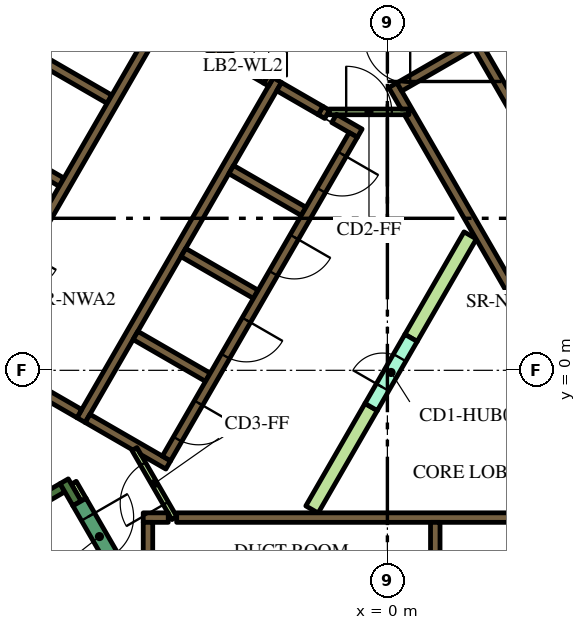
"""IFC4 building model, lengths in metres.
Left out: names, types, materials, properties, quantities, classifications, styles, units other than length and angle.
Written with IfcOpenShell. Run it as: python <this file> out.ifc"""

import sys

from ifc_helpers import new_model, si_unit, direction, frame, frame_2d, origin, place, context, subcontext, project, spatial, polyline, rectangle, outline, extrude, element, fill, save


model = new_model("IFC4")
c1 = context("Model", 3, precision=1e-05, world=origin(), true_north=direction((0.0, 1.0)))
c2 = subcontext(c1, "Body", "Model", "MODEL_VIEW")
j1 = project(units=[si_unit("LENGTHUNIT", "METRE"), si_unit("PLANEANGLEUNIT", "RADIAN")], contexts=[c1])
p1 = place(None, origin())
s1 = spatial("IfcSite", under=j1, at=p1, CompositionType="ELEMENT")
p2 = place(p1, origin())
s2 = spatial("IfcBuilding", under=s1, at=p2, CompositionType="ELEMENT")
p3 = place(p2, frame((0.0, 0.0, 39.3)))
s3 = spatial("IfcBuildingStorey", under=s2, at=p3, CompositionType="ELEMENT", Elevation=39.3)
p4 = place(p3, frame((-15.36, -1.503, 0.0), z_axis=(0.0, 0.0, 1.0), x_axis=(0.50000389221, 0.866023156604, 0.0)))
e1 = element("IfcWall", 1, at=p4, inside=s3, PredefinedType="SOLIDWALL", context=c2, shape_type="SweptSolid", body=[
    extrude(rectangle(XDim=21.0, YDim=0.9, at=frame_2d((10.5, 0.0))), origin(), (0.0, 0.0, 1.0), 3.9),
])
p5 = place(p3, frame((-14.44, -6.49, 0.0), z_axis=(0.0, 0.0, 1.0), x_axis=(0.866022966069, 0.500004222222, 0.0)))
e2 = element("IfcWall", 2, at=p5, inside=s3, PredefinedType="SOLIDWALL", context=c2, shape_type="SweptSolid", body=[
    extrude(rectangle(XDim=6.8, YDim=0.25, at=frame_2d((3.4, 0.0))), origin(), (0.0, 0.0, 1.0), 3.9),
])
p6 = place(p3, frame((-8.168, -3.503, 0.0), z_axis=(0.0, 0.0, 1.0), x_axis=(-0.499952099219, 0.866053057547, 0.0)))
e3 = element("IfcWall", 3, at=p6, inside=s3, PredefinedType="SOLIDWALL", context=c2, shape_type="SweptSolid", body=[
    extrude(rectangle(XDim=0.675, YDim=0.25, at=frame_2d((0.337, 0.0))), origin(), (0.0, 0.0, 1.0), 3.9),
])
p7 = place(p3, frame((-5.545, -3.875, 0.0), z_axis=(0.0, 0.0, 1.0), x_axis=(1.0, 0.0, 0.0)))
e4 = element("IfcWall", 4, at=p7, inside=s3, PredefinedType="SOLIDWALL", context=c2, shape_type="SweptSolid", body=[
    extrude(rectangle(XDim=11.97, YDim=0.25, at=frame_2d((5.985, 0.0))), origin(), (0.0, 0.0, 1.0), 3.9),
])
p8 = place(p3, frame((-6.425, -3.875, 0.0), z_axis=(0.0, 0.0, 1.0), x_axis=(1.0, 0.0, 0.0)))
e5 = element("IfcWall", 5, at=p8, inside=s3, PredefinedType="SOLIDWALL", context=c2, shape_type="SweptSolid", body=[
    extrude(rectangle(XDim=0.658, YDim=0.25, at=frame_2d((0.329, 0.0))), origin(), (0.0, 0.0, 1.0), 3.9),
])
p9 = place(p3, frame((1.26, -4.0, 0.0), z_axis=(0.0, 0.0, 1.0), x_axis=(0.0, -1.0, 0.0)))
e6 = element("IfcWall", 6, at=p9, inside=s3, PredefinedType="SOLIDWALL", context=c2, shape_type="SweptSolid", body=[
    extrude(rectangle(XDim=2.2, YDim=0.25, at=frame_2d((1.1, 0.0))), origin(), (0.0, 0.0, 1.0), 3.9),
])
p10 = place(p3, frame((-6.3, -4.0, 0.0), z_axis=(0.0, 0.0, 1.0), x_axis=(0.0, -1.0, 0.0)))
e7 = element("IfcWall", 7, at=p10, inside=s3, PredefinedType="SOLIDWALL", context=c2, shape_type="SweptSolid", body=[
    extrude(rectangle(XDim=3.154, YDim=0.25, at=frame_2d((1.577, 0.0))), origin(), (0.0, 0.0, 1.0), 3.9),
])
p11 = place(p3, origin())
e8 = element("IfcWall", 8, at=p11, inside=s3, PredefinedType="SOLIDWALL", context=c2, shape_type="SweptSolid", body=[
    extrude(outline(polyline([(0.566, 6.725), (0.566, 6.875), (0.566, 6.875), (0.565, 6.875), (0.361, 6.875), (0.035, 7.439), (0.252, 7.564), (0.377, 7.348), (6.552, -3.348), (6.677, -3.564), (6.46, -3.689), (0.448, 6.725), (0.565, 6.725), (0.566, 6.725), (0.566, 6.725)])), origin(), (0.0, 0.0, 1.0), 3.9),
])
p12 = place(p3, frame((0.314, 7.456, 0.0), z_axis=(0.0, 0.0, 1.0), x_axis=(0.866013897511, 0.50001992892, 0.0)))
e9 = element("IfcWall", 9, at=p12, inside=s3, PredefinedType="SOLIDWALL", context=c2, shape_type="SweptSolid", body=[
    extrude(rectangle(XDim=3.268, YDim=0.25, at=frame_2d((1.634, 0.0))), origin(), (0.0, 0.0, 1.0), 3.9),
])
p13 = place(p3, frame((-8.06, -1.311, 0.0), z_axis=(0.0, 0.0, 1.0), x_axis=(0.50000273126, 0.866023826885, 0.0)))
e10 = element("IfcWall", 10, at=p13, inside=s3, PredefinedType="SOLIDWALL", context=c2, shape_type="SweptSolid", body=[
    extrude(rectangle(XDim=10.33, YDim=0.25, at=frame_2d((5.165, 0.0))), origin(), (0.0, 0.0, 1.0), 3.9),
])
p14 = place(p3, frame((-1.758, 6.835, 0.0), z_axis=(0.0, 0.0, 1.0), x_axis=(0.865982457891, -0.500074377092, 0.0)))
e11 = element("IfcWall", 11, at=p14, inside=s3, PredefinedType="SOLIDWALL", context=c2, shape_type="SweptSolid", body=[
    extrude(rectangle(XDim=0.2, YDim=0.25, at=frame_2d((0.1, 0.0))), origin(), (0.0, 0.0, 1.0), 3.9),
])
p15 = place(p3, frame((-1.76, 6.836, 0.0), z_axis=(0.0, 0.0, 1.0), x_axis=(-0.865952863304, 0.500125622755, 0.0)))
e12 = element("IfcWall", 12, at=p15, inside=s3, PredefinedType="SOLIDWALL", context=c2, shape_type="SweptSolid", body=[
    extrude(rectangle(XDim=1.258, YDim=0.25, at=frame_2d((0.629, 0.0))), origin(), (0.0, 0.0, 1.0), 3.9),
])
p16 = place(p3, frame((-0.728, 6.24, 0.0), z_axis=(0.0, 0.0, 1.0), x_axis=(-0.865955664968, 0.500120771724, 0.0)))
e13 = element("IfcWall", 13, at=p16, inside=s3, PredefinedType="SOLIDWALL", context=c2, shape_type="SweptSolid", body=[
    extrude(rectangle(XDim=0.778, YDim=0.25, at=frame_2d((0.389, 0.0))), origin(), (0.0, 0.0, 1.0), 3.9),
])
for number, where, z_axis, x_axis in (
    (14, (-2.204, 4.182, 0.0), (0.0, 0.0, 1.0), (-0.866, 0.5, 0.0)),
    (15, (-5.369, 3.1, 0.0), (0.0, 0.0, 1.0), (0.866, -0.5, 0.0)),
    (16, (-4.724, -0.182, 0.0), (0.0, 0.0, 1.0), (-0.866, 0.5, 0.0)),
):
    element("IfcWall", number, at=place(p3, frame(where, z_axis=z_axis, x_axis=x_axis)), inside=s3, PredefinedType="SOLIDWALL", context=c2, shape_type="SweptSolid", body=[
        extrude(rectangle(XDim=2.2, YDim=0.25, at=frame_2d((1.1, 0.0))), origin(), (0.0, 0.0, 1.0), 3.9),
    ])
e17 = element("IfcWall", 17, at=p11, inside=s3, PredefinedType="SOLIDWALL", context=c2, shape_type="SweptSolid", body=[
    extrude(outline(polyline([(-5.922, -2.257), (-5.922, -2.257), (-5.705, -2.382), (-5.83, -2.598), (-6.483, -2.221), (-6.591, -2.033), (-6.591, -2.033), (-6.7, -2.096), (-7.952, -1.373), (-7.827, -1.156), (-5.922, -2.257)])), origin(), (0.0, 0.0, 1.0), 3.9),
])
p17 = place(p3, frame((-8.106, -1.14, 0.0), z_axis=(0.0, 0.0, 1.0), x_axis=(-0.866000643155, 0.500042884217, 0.0)))
e18 = element("IfcWall", 18, at=p17, inside=s3, PredefinedType="SOLIDWALL", context=c2, shape_type="SweptSolid", body=[
    extrude(rectangle(XDim=5.65, YDim=0.25, at=frame_2d((2.825, 0.0))), origin(), (0.0, 0.0, 1.0), 3.9),
])
e19 = element("IfcWall", 19, at=p11, inside=s3, PredefinedType="SOLIDWALL", context=c2, shape_type="SweptSolid", body=[
    extrude(outline(polyline([(-3.128, 7.481), (-3.259, 7.557), (-3.134, 7.773), (-3.003, 7.698), (-3.128, 7.481)])), origin(), (0.0, 0.0, 1.0), 3.9),
])
for number, where, z_axis, x_axis in (
    (20, (-8.574, 4.95, 0.0), (0.0, 0.0, 1.0), (-0.866, 0.5, 0.0)),
    (21, (-7.314, 7.132, 0.0), (0.0, 0.0, 1.0), (-0.866, 0.5, 0.0)),
):
    element("IfcWall", number, at=place(p3, frame(where, z_axis=z_axis, x_axis=x_axis)), inside=s3, PredefinedType="SOLIDWALL", context=c2, shape_type="SweptSolid", body=[
        extrude(rectangle(XDim=2.2, YDim=0.25, at=frame_2d((1.1, 0.0))), origin(), (0.0, 0.0, 1.0), 3.9),
    ])
p18 = place(p3, frame((-7.959, 10.415, 0.0), z_axis=(0.0, 0.0, 1.0), x_axis=(0.866020958405, -0.500007699544, 0.0)))
e22 = element("IfcWall", 22, at=p18, inside=s3, PredefinedType="SOLIDWALL", context=c2, shape_type="SweptSolid", body=[
    extrude(rectangle(XDim=4.1, YDim=0.25, at=frame_2d((2.05, 0.0))), origin(), (0.0, 0.0, 1.0), 3.9),
])
p19 = place(p3, frame((-8.252, -2.958, 0.0), z_axis=(0.0, 0.0, 1.0), x_axis=(0.500174715838, -0.865924508047, 0.0)))
e23 = element("IfcWall", 23, at=p19, inside=s3, PredefinedType="PARTITIONING", context=c2, shape_type="SweptSolid", body=[
    extrude(rectangle(XDim=0.514, YDim=0.15, at=frame_2d((0.257, 0.0))), origin(), (0.0, 0.0, 1.0), 2.75),
])
e24 = element("IfcWall", 24, at=p11, inside=s3, PredefinedType="PARTITIONING", context=c2, shape_type="SweptSolid", body=[
    extrude(outline(polyline([(-0.59, -0.872), (-0.265, -1.059), (-1.822, -3.756), (-2.147, -3.568), (-0.59, -0.872)])), origin(), (0.0, 0.0, 1.0), 2.75),
])
e25 = element("IfcWall", 25, at=p11, inside=s3, PredefinedType="PARTITIONING", context=c2, shape_type="SweptSolid", body=[
    extrude(outline(polyline([(2.017, 3.643), (2.342, 3.456), (0.785, 0.76), (0.46, 0.947), (2.017, 3.643)])), origin(), (0.0, 0.0, 1.0), 2.75),
])
p20 = place(p3, frame((8.565, -2.185, 0.0), z_axis=(0.0, 0.0, 1.0), x_axis=(-0.499997954832, 0.866026584559, 0.0)))
e26 = element("IfcWall", 26, at=p20, inside=s3, PredefinedType="SOLIDWALL", context=c2, shape_type="SweptSolid", body=[
    extrude(rectangle(XDim=12.35, YDim=0.25, at=frame_2d((6.175, 0.0))), origin(), (0.0, 0.0, 1.0), 3.9),
])
p21 = place(p20, frame((5.725, 0.0, 0.0)))
e27 = element("IfcOpeningElement", 27, at=p21, cuts=e26, PredefinedType="OPENING", context=c2, shape_type="SweptSolid", body=[
    extrude(rectangle(XDim=0.9, YDim=2.1, at=frame_2d((0.45, 1.05))), frame((0.0, 0.135, 0.0), z_axis=(0.0, -1.0, 0.0), x_axis=(1.0, 0.0, 0.0)), (0.0, 0.0, 1.0), 0.27),
])
p22 = place(p3, frame((-6.008, 9.144, 0.0), z_axis=(0.0, 0.0, 1.0), x_axis=(-0.500006956611, -0.866021387346, 0.0)))
e28 = element("IfcWall", 28, at=p22, inside=s3, PredefinedType="SOLIDWALL", context=c2, shape_type="SweptSolid", body=[
    extrude(rectangle(XDim=9.83, YDim=0.25, at=frame_2d((4.915, 0.0))), origin(), (0.0, 0.0, 1.0), 3.9),
])
p23 = place(p22, frame((6.985, 0.0, 0.0)))
e29 = element("IfcOpeningElement", 29, at=p23, cuts=e28, PredefinedType="OPENING", context=c2, shape_type="SweptSolid", body=[
    extrude(rectangle(XDim=0.9, YDim=2.1, at=frame_2d((0.45, 1.05))), frame((0.0, 0.135, 0.0), z_axis=(0.0, -1.0, 0.0), x_axis=(1.0, 0.0, 0.0)), (0.0, 0.0, 1.0), 0.27),
])
p24 = place(p3, frame((-0.898, 6.194, 0.0), z_axis=(0.0, 0.0, 1.0), x_axis=(-0.499996202215, -0.866027596426, 0.0)))
e30 = element("IfcWall", 30, at=p24, inside=s3, PredefinedType="SOLIDWALL", context=c2, shape_type="SweptSolid", body=[
    extrude(rectangle(XDim=9.83, YDim=0.25, at=frame_2d((4.915, 0.0))), origin(), (0.0, 0.0, 1.0), 3.9),
])
p25 = place(p24, frame((0.585, 0.0, 0.0)))
e31 = element("IfcOpeningElement", 31, at=p25, cuts=e30, PredefinedType="OPENING", context=c2, shape_type="SweptSolid", body=[
    extrude(rectangle(XDim=1.1, YDim=2.1, at=frame_2d((0.55, 1.05))), frame((0.0, 0.135, 0.0), z_axis=(0.0, -1.0, 0.0), x_axis=(1.0, 0.0, 0.0)), (0.0, 0.0, 1.0), 0.27),
])
p26 = place(p24, frame((3.105, 0.0, 0.0)))
e32 = element("IfcOpeningElement", 32, at=p26, cuts=e30, PredefinedType="OPENING", context=c2, shape_type="SweptSolid", body=[
    extrude(rectangle(XDim=1.1, YDim=2.1, at=frame_2d((0.55, 1.05))), frame((0.0, 0.135, 0.0), z_axis=(0.0, -1.0, 0.0), x_axis=(1.0, 0.0, 0.0)), (0.0, 0.0, 1.0), 0.27),
])
p27 = place(p24, frame((5.625, 0.0, 0.0)))
e33 = element("IfcOpeningElement", 33, at=p27, cuts=e30, PredefinedType="OPENING", context=c2, shape_type="SweptSolid", body=[
    extrude(rectangle(XDim=1.1, YDim=2.1, at=frame_2d((0.55, 1.05))), frame((0.0, 0.135, 0.0), z_axis=(0.0, -1.0, 0.0), x_axis=(1.0, 0.0, 0.0)), (0.0, 0.0, 1.0), 0.27),
])
p28 = place(p24, frame((8.145, 0.0, 0.0)))
e34 = element("IfcOpeningElement", 34, at=p28, cuts=e30, PredefinedType="OPENING", context=c2, shape_type="SweptSolid", body=[
    extrude(rectangle(XDim=1.1, YDim=2.1, at=frame_2d((0.55, 1.05))), frame((0.0, 0.135, 0.0), z_axis=(0.0, -1.0, 0.0), x_axis=(1.0, 0.0, 0.0)), (0.0, 0.0, 1.0), 0.27),
])
p29 = place(p3, frame((-8.103, -3.466, 0.0), z_axis=(0.0, 0.0, 1.0), x_axis=(0.500078061341, -0.865980330357, 0.0)))
e35 = element("IfcWall", 35, at=p29, inside=s3, PredefinedType="SOLIDWALL", context=c2, shape_type="SweptSolid", body=[
    extrude(rectangle(XDim=2.1, YDim=0.4, at=frame_2d((1.05, 0.0))), origin(), (0.0, 0.0, 1.0), 3.9),
])
p30 = place(p29, frame((0.45, 0.0, 0.0)))
e36 = element("IfcOpeningElement", 36, at=p30, cuts=e35, PredefinedType="OPENING", context=c2, shape_type="SweptSolid", body=[
    extrude(rectangle(XDim=1.2, YDim=2.1, at=frame_2d((0.6, 1.05))), frame((0.0, 0.21, 0.0), z_axis=(0.0, -1.0, 0.0), x_axis=(1.0, 0.0, 0.0)), (0.0, 0.0, 1.0), 0.42),
])
p31 = place(p3, frame((-0.427, -0.966, 0.0), z_axis=(0.0, 0.0, 1.0), x_axis=(0.49994051562, 0.866059744384, 0.0)))
e37 = element("IfcWall", 37, at=p31, inside=s3, PredefinedType="PARTITIONING", context=c2, shape_type="SweptSolid", body=[
    extrude(rectangle(XDim=2.1, YDim=0.375, at=frame_2d((1.05, 0.0))), origin(), (0.0, 0.0, 1.0), 2.75),
])
p32 = place(p31, frame((0.6, 0.0, 0.0)))
e38 = element("IfcOpeningElement", 38, at=p32, cuts=e37, PredefinedType="OPENING", context=c2, shape_type="SweptSolid", body=[
    extrude(rectangle(XDim=0.9, YDim=2.1, at=frame_2d((0.45, 1.05))), frame((0.0, 0.198, 0.0), z_axis=(0.0, -1.0, 0.0), x_axis=(1.0, 0.0, 0.0)), (0.0, 0.0, 1.0), 0.395),
])
p33 = place(p3, frame((-1.534, 6.8, 0.0), z_axis=(0.0, 0.0, 1.0), x_axis=(1.0, 0.0, 0.0)))
e39 = element("IfcWall", 39, at=p33, inside=s3, PredefinedType="PARTITIONING", context=c2, shape_type="SweptSolid", body=[
    extrude(rectangle(XDim=2.1, YDim=0.15, at=frame_2d((1.05, 0.0))), origin(), (0.0, 0.0, 1.0), 2.75),
])
p34 = place(p33, frame((0.45, 0.0, 0.0)))
e40 = element("IfcOpeningElement", 40, at=p34, cuts=e39, PredefinedType="OPENING", context=c2, shape_type="SweptSolid", body=[
    extrude(rectangle(XDim=1.2, YDim=2.1, at=frame_2d((0.6, 1.05))), frame((0.0, 0.085, 0.0), z_axis=(0.0, -1.0, 0.0), x_axis=(1.0, 0.0, 0.0)), (0.0, 0.0, 1.0), 0.17),
])
p35 = place(p3, frame((-5.606, -3.89, 0.0), z_axis=(0.0, 0.0, 1.0), x_axis=(-0.500027713859, 0.866009402589, 0.0)))
e41 = element("IfcWall", 41, at=p35, inside=s3, PredefinedType="PARTITIONING", context=c2, shape_type="SweptSolid", body=[
    extrude(rectangle(XDim=2.1, YDim=0.15, at=frame_2d((1.05, 0.0))), origin(), (0.0, 0.0, 1.0), 2.75),
])
p36 = place(p35, frame((0.45, 0.0, 0.0)))
e42 = element("IfcOpeningElement", 42, at=p36, cuts=e41, PredefinedType="OPENING", context=c2, shape_type="SweptSolid", body=[
    extrude(rectangle(XDim=1.2, YDim=2.1, at=frame_2d((0.6, 1.05))), frame((0.0, 0.085, 0.0), z_axis=(0.0, -1.0, 0.0), x_axis=(1.0, 0.0, 0.0)), (0.0, 0.0, 1.0), 0.17),
])
p37 = place(p3, frame((-4.409, 8.365, 0.0), z_axis=(0.0, 0.0, 1.0), x_axis=(0.866034573852, -0.49998411664, 0.0)))
e43 = element("IfcWall", 43, at=p37, inside=s3, PredefinedType="SOLIDWALL", context=c2, shape_type="SweptSolid", body=[
    extrude(rectangle(XDim=1.4, YDim=0.25, at=frame_2d((0.7, 0.0))), origin(), (0.0, 0.0, 1.0), 3.9),
])
p38 = place(p37, frame((0.1, 0.0, 0.0)))
e44 = element("IfcOpeningElement", 44, at=p38, cuts=e43, PredefinedType="OPENING", context=c2, shape_type="SweptSolid", body=[
    extrude(rectangle(XDim=1.2, YDim=2.1, at=frame_2d((0.6, 1.05))), frame((0.0, 0.135, 0.0), z_axis=(0.0, -1.0, 0.0), x_axis=(1.0, 0.0, 0.0)), (0.0, 0.0, 1.0), 0.27),
])
p39 = place(p3, frame((-19.081, -3.9, 0.0), z_axis=(0.0, 0.0, 1.0), x_axis=(0.499998313975, 0.866026377209, 0.0)))
e45 = element("IfcWall", 45, at=p39, inside=s3, PredefinedType="PARTITIONING", context=c2, shape_type="SweptSolid", body=[
    extrude(rectangle(XDim=25.766, YDim=0.15, at=frame_2d((12.883, 0.0))), origin(), (0.0, 0.0, 1.0), 2.75),
])
p40 = place(p39, frame((16.196, 0.0, 0.0)))
e46 = element("IfcOpeningElement", 46, at=p40, cuts=e45, PredefinedType="OPENING", context=c2, shape_type="SweptSolid", body=[
    extrude(rectangle(XDim=1.0, YDim=2.1, at=frame_2d((0.5, 1.05))), frame((0.0, 0.085, 0.0), z_axis=(0.0, -1.0, 0.0), x_axis=(1.0, 0.0, 0.0)), (0.0, 0.0, 1.0), 0.17),
])
p41 = place(p39, frame((14.889, 0.0, 0.0)))
e47 = element("IfcOpeningElement", 47, at=p41, cuts=e45, PredefinedType="OPENING", context=c2, shape_type="SweptSolid", body=[
    extrude(rectangle(XDim=1.0, YDim=2.1, at=frame_2d((0.5, 1.05))), frame((0.0, 0.085, 0.0), z_axis=(0.0, -1.0, 0.0), x_axis=(1.0, 0.0, 0.0)), (0.0, 0.0, 1.0), 0.17),
])
p42 = place(p39, frame((3.698, 0.0, 0.0)))
e48 = element("IfcOpeningElement", 48, at=p42, cuts=e45, PredefinedType="OPENING", context=c2, shape_type="SweptSolid", body=[
    extrude(rectangle(XDim=1.1, YDim=2.1, at=frame_2d((0.55, 1.05))), frame((0.0, 0.085, 0.0), z_axis=(0.0, -1.0, 0.0), x_axis=(1.0, 0.0, 0.0)), (0.0, 0.0, 1.0), 0.17),
])
p43 = place(p39, frame((2.392, 0.0, 0.0)))
e49 = element("IfcOpeningElement", 49, at=p43, cuts=e45, PredefinedType="OPENING", context=c2, shape_type="SweptSolid", body=[
    extrude(rectangle(XDim=1.0, YDim=2.1, at=frame_2d((0.5, 1.05))), frame((0.0, 0.085, 0.0), z_axis=(0.0, -1.0, 0.0), x_axis=(1.0, 0.0, 0.0)), (0.0, 0.0, 1.0), 0.17),
])
p44 = place(p25, origin())
e50 = element("IfcDoor", 50, at=p44, inside=s3, OperationType="DOUBLE_DOOR_SLIDING", PredefinedType="DOOR", context=c2, shape_type="SweptSolid", body=[
    extrude(rectangle(XDim=1.1, YDim=2.1, at=frame_2d((0.55, 1.05))), frame((0.0, 0.025, 0.0), z_axis=(0.0, -1.0, 0.0), x_axis=(1.0, 0.0, 0.0)), (0.0, 0.0, 1.0), 0.05),
])
fill(e31, e50)
p45 = place(p26, origin())
e51 = element("IfcDoor", 51, at=p45, inside=s3, OperationType="DOUBLE_DOOR_SLIDING", PredefinedType="DOOR", context=c2, shape_type="SweptSolid", body=[
    extrude(rectangle(XDim=1.1, YDim=2.1, at=frame_2d((0.55, 1.05))), frame((0.0, 0.025, 0.0), z_axis=(0.0, -1.0, 0.0), x_axis=(1.0, 0.0, 0.0)), (0.0, 0.0, 1.0), 0.05),
])
fill(e32, e51)
p46 = place(p27, origin())
e52 = element("IfcDoor", 52, at=p46, inside=s3, OperationType="DOUBLE_DOOR_SLIDING", PredefinedType="DOOR", context=c2, shape_type="SweptSolid", body=[
    extrude(rectangle(XDim=1.1, YDim=2.1, at=frame_2d((0.55, 1.05))), frame((0.0, 0.025, 0.0), z_axis=(0.0, -1.0, 0.0), x_axis=(1.0, 0.0, 0.0)), (0.0, 0.0, 1.0), 0.05),
])
fill(e33, e52)
p47 = place(p28, origin())
e53 = element("IfcDoor", 53, at=p47, inside=s3, OperationType="DOUBLE_DOOR_SLIDING", PredefinedType="DOOR", context=c2, shape_type="SweptSolid", body=[
    extrude(rectangle(XDim=1.1, YDim=2.1, at=frame_2d((0.55, 1.05))), frame((0.0, 0.025, 0.0), z_axis=(0.0, -1.0, 0.0), x_axis=(1.0, 0.0, 0.0)), (0.0, 0.0, 1.0), 0.05),
])
fill(e34, e53)
p48 = place(p30, origin())
e54 = element("IfcDoor", 54, at=p48, inside=s3, OperationType="SINGLE_SWING_LEFT", PredefinedType="DOOR", context=c2, shape_type="SweptSolid", body=[
    extrude(rectangle(XDim=1.2, YDim=2.1, at=frame_2d((0.6, 1.05))), frame((0.0, 0.025, 0.0), z_axis=(0.0, -1.0, 0.0), x_axis=(1.0, 0.0, 0.0)), (0.0, 0.0, 1.0), 0.05),
])
fill(e36, e54)
p49 = place(p32, origin())
e55 = element("IfcDoor", 55, at=p49, inside=s3, OperationType="SINGLE_SWING_LEFT", PredefinedType="DOOR", context=c2, shape_type="SweptSolid", body=[
    extrude(rectangle(XDim=0.9, YDim=2.1, at=frame_2d((0.45, 1.05))), frame((0.0, 0.025, 0.0), z_axis=(0.0, -1.0, 0.0), x_axis=(1.0, 0.0, 0.0)), (0.0, 0.0, 1.0), 0.05),
])
fill(e38, e55)
p50 = place(p34, origin())
e56 = element("IfcDoor", 56, at=p50, inside=s3, OperationType="SINGLE_SWING_LEFT", PredefinedType="DOOR", context=c2, shape_type="SweptSolid", body=[
    extrude(rectangle(XDim=1.2, YDim=2.1, at=frame_2d((0.6, 1.05))), frame((0.0, 0.025, 0.0), z_axis=(0.0, -1.0, 0.0), x_axis=(1.0, 0.0, 0.0)), (0.0, 0.0, 1.0), 0.05),
])
fill(e40, e56)
p51 = place(p36, origin())
e57 = element("IfcDoor", 57, at=p51, inside=s3, OperationType="SINGLE_SWING_LEFT", PredefinedType="DOOR", context=c2, shape_type="SweptSolid", body=[
    extrude(rectangle(XDim=1.2, YDim=2.1, at=frame_2d((0.6, 1.05))), frame((0.0, 0.025, 0.0), z_axis=(0.0, -1.0, 0.0), x_axis=(1.0, 0.0, 0.0)), (0.0, 0.0, 1.0), 0.05),
])
fill(e42, e57)
p52 = place(p38, origin())
e58 = element("IfcDoor", 58, at=p52, inside=s3, OperationType="SINGLE_SWING_LEFT", PredefinedType="DOOR", context=c2, shape_type="SweptSolid", body=[
    extrude(rectangle(XDim=1.2, YDim=2.1, at=frame_2d((0.6, 1.05))), frame((0.0, 0.025, 0.0), z_axis=(0.0, -1.0, 0.0), x_axis=(1.0, 0.0, 0.0)), (0.0, 0.0, 1.0), 0.05),
])
fill(e44, e58)
save(model, sys.argv[1])
